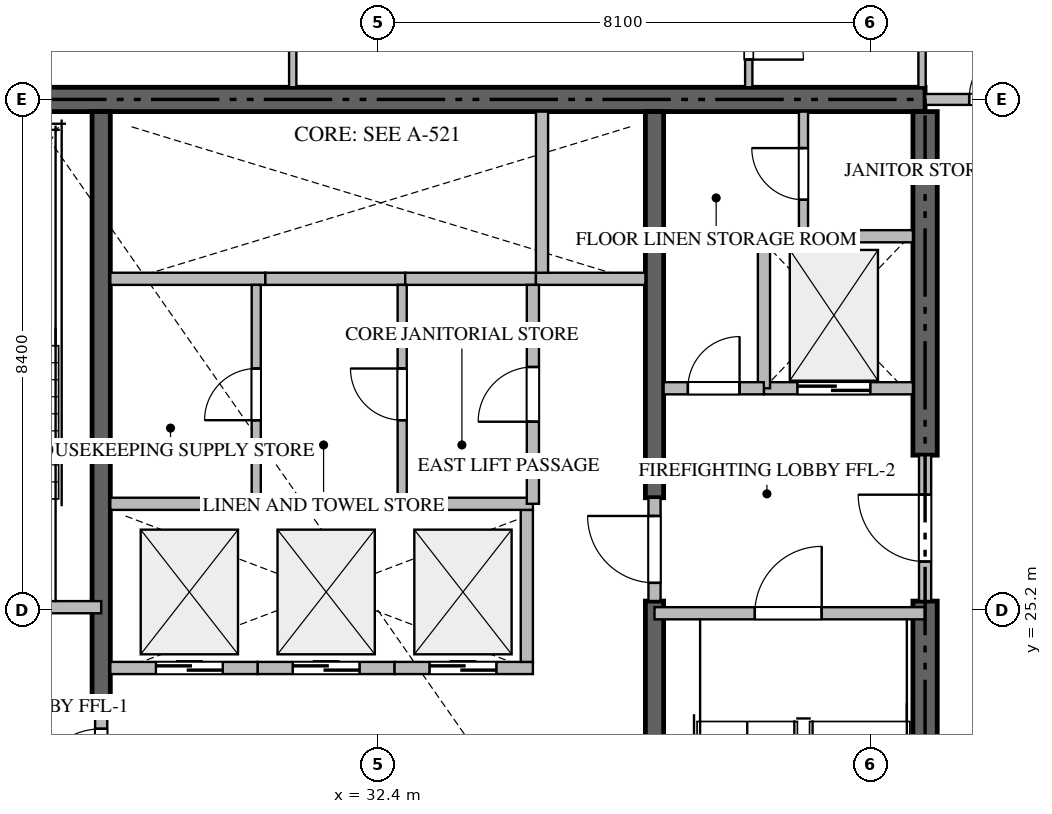
"""IFC4 building model, lengths in metres.
Left out: names, types, materials, properties, quantities, classifications, styles, units other than length and angle.
Written with IfcOpenShell. Run it as: python <this file> out.ifc"""

import sys

from ifc_helpers import new_model, si_unit, direction, frame, frame_2d, origin, place, context, subcontext, project, spatial, rectangle, extrude, source, transform, mapped, element, fill, save


model = new_model("IFC4")
c1 = context("Model", 3, precision=1e-05, world=origin(), true_north=direction((0.0, 1.0)))
c2 = subcontext(c1, "Body", "Model", "MODEL_VIEW")
j1 = project(units=[si_unit("LENGTHUNIT", "METRE"), si_unit("PLANEANGLEUNIT", "RADIAN")], contexts=[c1])
p1 = place(None, origin())
s1 = spatial("IfcSite", under=j1, at=p1, CompositionType="ELEMENT")
p2 = place(p1, origin())
s2 = spatial("IfcBuilding", under=s1, at=p2, CompositionType="ELEMENT")
p3 = place(p2, frame((0.0, 0.0, 157.65)))
s3 = spatial("IfcBuildingStorey", under=s2, at=p3, CompositionType="ELEMENT", Elevation=157.65)
p4 = place(p3, frame((41.4, 33.6, -0.26), z_axis=(0.0, 0.0, 1.0), x_axis=(-1.0, 0.0, 0.0)))
e1 = element("IfcWall", 1, at=p4, inside=s3, PredefinedType="SHEAR", context=c2, shape_type="SweptSolid", body=[
    extrude(rectangle(XDim=18.0, YDim=0.4, at=frame_2d((9.0, 0.0))), origin(), (0.0, 0.0, 1.0), 3.748),
])
p5 = place(p3, frame((41.4, 17.0, -0.26), z_axis=(0.0, 0.0, 1.0), x_axis=(0.0, 1.0, 0.0)))
e2 = element("IfcWall", 2, at=p5, inside=s3, PredefinedType="SHEAR", context=c2, shape_type="SweptSolid", body=[
    extrude(rectangle(XDim=8.35, YDim=0.4, at=frame_2d((4.175, 0.0))), origin(), (0.0, 0.0, 1.0), 3.748),
])
p6 = place(p3, frame((41.4, 27.75, -0.26), z_axis=(0.0, 0.0, 1.0), x_axis=(0.0, 1.0, 0.0)))
e3 = element("IfcWall", 3, at=p6, inside=s3, PredefinedType="SHEAR", context=c2, shape_type="SweptSolid", body=[
    extrude(rectangle(XDim=5.65, YDim=0.4, at=frame_2d((2.825, 0.0))), origin(), (0.0, 0.0, 1.0), 3.748),
])
p7 = place(p3, frame((27.85, 23.55, -0.26), z_axis=(0.0, 0.0, 1.0), x_axis=(0.0, 1.0, 0.0)))
e4 = element("IfcWall", 4, at=p7, inside=s3, PredefinedType="SHEAR", context=c2, shape_type="SweptSolid", body=[
    extrude(rectangle(XDim=9.85, YDim=0.3, at=frame_2d((4.925, 0.0))), origin(), (0.0, 0.0, 1.0), 3.748),
])
p8 = place(p3, frame((36.95, 17.0, -0.26), z_axis=(0.0, 0.0, 1.0), x_axis=(0.0, 1.0, 0.0)))
e5 = element("IfcWall", 5, at=p8, inside=s3, PredefinedType="SHEAR", context=c2, shape_type="SweptSolid", body=[
    extrude(rectangle(XDim=8.35, YDim=0.3, at=frame_2d((4.175, 0.0))), origin(), (0.0, 0.0, 1.0), 3.748),
])
p9 = place(p3, frame((36.95, 27.05, -0.26), z_axis=(0.0, 0.0, 1.0), x_axis=(0.0, 1.0, 0.0)))
e6 = element("IfcWall", 6, at=p9, inside=s3, PredefinedType="SHEAR", context=c2, shape_type="SweptSolid", body=[
    extrude(rectangle(XDim=6.35, YDim=0.3, at=frame_2d((3.175, 0.0))), origin(), (0.0, 0.0, 1.0), 3.748),
])
p10 = place(p3, frame((23.4, 25.25, 0.0), z_axis=(0.0, 0.0, 1.0), x_axis=(1.0, 0.0, 0.0)))
e7 = element("IfcWall", 7, at=p10, inside=s3, PredefinedType="STANDARD", context=c2, shape_type="SweptSolid", body=[
    extrude(rectangle(XDim=4.45, YDim=0.2, at=frame_2d((2.225, 0.0))), origin(), (0.0, 0.0, 1.0), 3.49),
])
p11 = place(p10, frame((1.65, 0.0, 0.0)))
e8 = element("IfcOpeningElement", 8, at=p11, cuts=e7, PredefinedType="OPENING", context=c2, shape_type="SweptSolid", body=[
    extrude(rectangle(XDim=1.1, YDim=2.15, at=frame_2d((0.55, 1.075))), frame((0.0, 0.11, 0.0), z_axis=(0.0, -1.0, 0.0), x_axis=(1.0, 0.0, 0.0)), (0.0, 0.0, 1.0), 0.22),
])
p12 = place(p3, frame((36.95, 25.15, 0.0), z_axis=(0.0, 0.0, 1.0), x_axis=(1.0, 0.0, 0.0)))
e9 = element("IfcWall", 9, at=p12, inside=s3, PredefinedType="STANDARD", context=c2, shape_type="SweptSolid", body=[
    extrude(rectangle(XDim=4.45, YDim=0.2, at=frame_2d((2.225, 0.0))), origin(), (0.0, 0.0, 1.0), 3.49),
])
p13 = place(p12, frame((1.65, 0.0, 0.0)))
e10 = element("IfcOpeningElement", 10, at=p13, cuts=e9, PredefinedType="OPENING", context=c2, shape_type="SweptSolid", body=[
    extrude(rectangle(XDim=1.1, YDim=2.15, at=frame_2d((0.55, 1.075))), frame((0.0, 0.11, 0.0), z_axis=(0.0, -1.0, 0.0), x_axis=(1.0, 0.0, 0.0)), (0.0, 0.0, 1.0), 0.22),
])
p14 = place(p3, frame((38.75, 28.85, 0.0), z_axis=(0.0, 0.0, 1.0), x_axis=(1.0, 0.0, 0.0)))
e11 = element("IfcWall", 11, at=p14, inside=s3, PredefinedType="STANDARD", context=c2, shape_type="SweptSolid", body=[
    extrude(rectangle(XDim=2.45, YDim=0.2, at=frame_2d((1.225, 0.0))), origin(), (0.0, 0.0, 1.0), 3.49),
])
p15 = place(p14, frame((0.55, 0.0, 0.0)))
e12 = element("IfcOpeningElement", 12, at=p15, cuts=e11, PredefinedType="OPENING", context=c2, shape_type="SweptSolid", body=[
    extrude(rectangle(XDim=1.2, YDim=2.2, at=frame_2d((0.6, 1.1))), frame((0.0, 0.11, 0.0), z_axis=(0.0, -1.0, 0.0), x_axis=(1.0, 0.0, 0.0)), (0.0, 0.0, 1.0), 0.22),
])
p16 = place(p3, frame((28.0, 24.25, 0.0), z_axis=(0.0, 0.0, 1.0), x_axis=(1.0, 0.0, 0.0)))
e13 = element("IfcWall", 13, at=p16, inside=s3, PredefinedType="STANDARD", context=c2, shape_type="SweptSolid", body=[
    extrude(rectangle(XDim=2.425, YDim=0.2, at=frame_2d((1.212, 0.0))), origin(), (0.0, 0.0, 1.0), 3.49),
])
p17 = place(p16, frame((0.75, 0.0, 0.0)))
e14 = element("IfcOpeningElement", 14, at=p17, cuts=e13, PredefinedType="OPENING", context=c2, shape_type="SweptSolid", body=[
    extrude(rectangle(XDim=1.1, YDim=2.2, at=frame_2d((0.55, 1.1))), frame((0.0, 0.11, 0.0), z_axis=(0.0, -1.0, 0.0), x_axis=(1.0, 0.0, 0.0)), (0.0, 0.0, 1.0), 0.22),
])
p18 = place(p3, frame((30.425, 24.25, 0.0), z_axis=(0.0, 0.0, 1.0), x_axis=(1.0, 0.0, 0.0)))
e15 = element("IfcWall", 15, at=p18, inside=s3, PredefinedType="STANDARD", context=c2, shape_type="SweptSolid", body=[
    extrude(rectangle(XDim=2.25, YDim=0.2, at=frame_2d((1.125, 0.0))), origin(), (0.0, 0.0, 1.0), 3.49),
])
p19 = place(p18, frame((0.575, 0.0, 0.0)))
e16 = element("IfcOpeningElement", 16, at=p19, cuts=e15, PredefinedType="OPENING", context=c2, shape_type="SweptSolid", body=[
    extrude(rectangle(XDim=1.1, YDim=2.2, at=frame_2d((0.55, 1.1))), frame((0.0, 0.11, 0.0), z_axis=(0.0, -1.0, 0.0), x_axis=(1.0, 0.0, 0.0)), (0.0, 0.0, 1.0), 0.22),
])
p20 = place(p3, frame((32.675, 24.25, 0.0), z_axis=(0.0, 0.0, 1.0), x_axis=(1.0, 0.0, 0.0)))
e17 = element("IfcWall", 17, at=p20, inside=s3, PredefinedType="STANDARD", context=c2, shape_type="SweptSolid", body=[
    extrude(rectangle(XDim=2.275, YDim=0.2, at=frame_2d((1.137, 0.0))), origin(), (0.0, 0.0, 1.0), 3.49),
])
p21 = place(p20, frame((0.575, 0.0, 0.0)))
e18 = element("IfcOpeningElement", 18, at=p21, cuts=e17, PredefinedType="OPENING", context=c2, shape_type="SweptSolid", body=[
    extrude(rectangle(XDim=1.1, YDim=2.2, at=frame_2d((0.55, 1.1))), frame((0.0, 0.11, 0.0), z_axis=(0.0, -1.0, 0.0), x_axis=(1.0, 0.0, 0.0)), (0.0, 0.0, 1.0), 0.22),
])
p22 = place(p3, frame((34.85, 24.35, 0.0), z_axis=(0.0, 0.0, 1.0), x_axis=(0.0, 1.0, 0.0)))
e19 = element("IfcWall", 19, at=p22, inside=s3, PredefinedType="STANDARD", context=c2, shape_type="SweptSolid", body=[
    extrude(rectangle(XDim=2.5, YDim=0.2, at=frame_2d((1.25, 0.0))), origin(), (0.0, 0.0, 1.0), 3.49),
])
p23 = place(p3, frame((28.0, 30.65, 0.0), z_axis=(0.0, 0.0, 1.0), x_axis=(1.0, 0.0, 0.0)))
e20 = element("IfcWall", 20, at=p23, inside=s3, PredefinedType="STANDARD", context=c2, shape_type="SweptSolid", body=[
    extrude(rectangle(XDim=2.55, YDim=0.2, at=frame_2d((1.275, 0.0))), origin(), (0.0, 0.0, 1.0), 3.49),
])
p24 = place(p3, frame((30.55, 30.65, 0.0), z_axis=(0.0, 0.0, 1.0), x_axis=(1.0, 0.0, 0.0)))
e21 = element("IfcWall", 21, at=p24, inside=s3, PredefinedType="STANDARD", context=c2, shape_type="SweptSolid", body=[
    extrude(rectangle(XDim=2.3, YDim=0.2, at=frame_2d((1.15, 0.0))), origin(), (0.0, 0.0, 1.0), 3.49),
])
p25 = place(p3, frame((32.85, 30.65, 0.0), z_axis=(0.0, 0.0, 1.0), x_axis=(1.0, 0.0, 0.0)))
e22 = element("IfcWall", 22, at=p25, inside=s3, PredefinedType="STANDARD", context=c2, shape_type="SweptSolid", body=[
    extrude(rectangle(XDim=2.15, YDim=0.2, at=frame_2d((1.075, 0.0))), origin(), (0.0, 0.0, 1.0), 3.49),
])
p26 = place(p3, frame((35.0, 30.65, 0.0), z_axis=(0.0, 0.0, 1.0), x_axis=(1.0, 0.0, 0.0)))
e23 = element("IfcWall", 23, at=p26, inside=s3, PredefinedType="STANDARD", context=c2, shape_type="SweptSolid", body=[
    extrude(rectangle(XDim=1.8, YDim=0.2, at=frame_2d((0.9, 0.0))), origin(), (0.0, 0.0, 1.0), 3.49),
])
p27 = place(p3, frame((35.1, 30.75, 0.0), z_axis=(0.0, 0.0, 1.0), x_axis=(0.0, 1.0, 0.0)))
e24 = element("IfcWall", 24, at=p27, inside=s3, PredefinedType="STANDARD", context=c2, shape_type="SweptSolid", body=[
    extrude(rectangle(XDim=2.65, YDim=0.2, at=frame_2d((1.325, 0.0))), origin(), (0.0, 0.0, 1.0), 3.49),
])
p28 = place(p3, frame((38.75, 28.85, 0.0), z_axis=(0.0, 0.0, 1.0), x_axis=(0.0, 1.0, 0.0)))
e25 = element("IfcWall", 25, at=p28, inside=s3, PredefinedType="STANDARD", context=c2, shape_type="SweptSolid", body=[
    extrude(rectangle(XDim=2.5, YDim=0.2, at=frame_2d((1.25, 0.0))), origin(), (0.0, 0.0, 1.0), 3.49),
])
p29 = place(p3, frame((38.75, 31.35, 0.0), z_axis=(0.0, 0.0, 1.0), x_axis=(1.0, 0.0, 0.0)))
e26 = element("IfcWall", 26, at=p29, inside=s3, PredefinedType="STANDARD", context=c2, shape_type="SweptSolid", body=[
    extrude(rectangle(XDim=2.45, YDim=0.2, at=frame_2d((1.225, 0.0))), origin(), (0.0, 0.0, 1.0), 3.49),
])
p30 = place(p3, frame((37.1, 28.85, 0.0), z_axis=(0.0, 0.0, 1.0), x_axis=(1.0, 0.0, 0.0)))
e27 = element("IfcWall", 27, at=p30, inside=s3, PredefinedType="STANDARD", context=c2, shape_type="SweptSolid", body=[
    extrude(rectangle(XDim=1.648, YDim=0.2, at=frame_2d((0.824, 0.0))), origin(), (0.0, 0.0, 1.0), 3.49),
])
p31 = place(p30, frame((0.399, 0.0, 0.0)))
e28 = element("IfcOpeningElement", 28, at=p31, cuts=e27, PredefinedType="OPENING", context=c2, shape_type="SweptSolid", body=[
    extrude(rectangle(XDim=0.85, YDim=2.1, at=frame_2d((0.425, 1.05))), frame((0.0, 0.11, 0.0), z_axis=(0.0, -1.0, 0.0), x_axis=(1.0, 0.0, 0.0)), (0.0, 0.0, 1.0), 0.22),
])
p32 = place(p3, frame((41.4, 25.352, 0.0), z_axis=(0.0, 0.0, 1.0), x_axis=(0.0, 1.0, 0.0)))
e29 = element("IfcWall", 29, at=p32, inside=s3, PredefinedType="STANDARD", context=c2, shape_type="SweptSolid", body=[
    extrude(rectangle(XDim=2.396, YDim=0.2, at=frame_2d((1.198, 0.0))), origin(), (0.0, 0.0, 1.0), 3.49),
])
p33 = place(p32, frame((0.648, 0.0, 0.0)))
e30 = element("IfcOpeningElement", 30, at=p33, cuts=e29, PredefinedType="OPENING", context=c2, shape_type="SweptSolid", body=[
    extrude(rectangle(XDim=1.1, YDim=2.15, at=frame_2d((0.55, 1.075))), frame((0.0, 0.11, 0.0), z_axis=(0.0, -1.0, 0.0), x_axis=(1.0, 0.0, 0.0)), (0.0, 0.0, 1.0), 0.22),
])
p34 = place(p3, frame((27.85, 21.852, 0.0), z_axis=(0.0, 0.0, 1.0), x_axis=(0.0, 1.0, 0.0)))
e31 = element("IfcWall", 31, at=p34, inside=s3, PredefinedType="STANDARD", context=c2, shape_type="SweptSolid", body=[
    extrude(rectangle(XDim=1.696, YDim=0.2, at=frame_2d((0.848, 0.0))), origin(), (0.0, 0.0, 1.0), 3.49),
])
p35 = place(p34, frame((0.298, 0.0, 0.0)))
e32 = element("IfcOpeningElement", 32, at=p35, cuts=e31, PredefinedType="OPENING", context=c2, shape_type="SweptSolid", body=[
    extrude(rectangle(XDim=1.1, YDim=2.15, at=frame_2d((0.55, 1.075))), frame((0.0, 0.11, 0.0), z_axis=(0.0, -1.0, 0.0), x_axis=(1.0, 0.0, 0.0)), (0.0, 0.0, 1.0), 0.22),
])
p36 = place(p3, frame((36.95, 25.352, 0.0), z_axis=(0.0, 0.0, 1.0), x_axis=(0.0, 1.0, 0.0)))
e33 = element("IfcWall", 33, at=p36, inside=s3, PredefinedType="STANDARD", context=c2, shape_type="SweptSolid", body=[
    extrude(rectangle(XDim=1.696, YDim=0.2, at=frame_2d((0.848, 0.0))), origin(), (0.0, 0.0, 1.0), 3.49),
])
p37 = place(p36, frame((0.298, 0.0, 0.0)))
e34 = element("IfcOpeningElement", 34, at=p37, cuts=e33, PredefinedType="OPENING", context=c2, shape_type="SweptSolid", body=[
    extrude(rectangle(XDim=1.1, YDim=2.15, at=frame_2d((0.55, 1.075))), frame((0.0, 0.11, 0.0), z_axis=(0.0, -1.0, 0.0), x_axis=(1.0, 0.0, 0.0)), (0.0, 0.0, 1.0), 0.22),
])
p38 = place(p3, frame((28.0, 26.95, 0.0), z_axis=(0.0, 0.0, 1.0), x_axis=(1.0, 0.0, 0.0)))
e35 = element("IfcWall", 35, at=p38, inside=s3, PredefinedType="STANDARD", context=c2, shape_type="SweptSolid", body=[
    extrude(rectangle(XDim=6.95, YDim=0.2, at=frame_2d((3.475, 0.0))), origin(), (0.0, 0.0, 1.0), 3.49),
])
p39 = place(p3, frame((39.4, 31.35, 0.0), z_axis=(0.0, 0.0, 1.0), x_axis=(0.0, 1.0, 0.0)))
e36 = element("IfcWall", 36, at=p39, inside=s3, PredefinedType="PARTITIONING", context=c2, shape_type="SweptSolid", body=[
    extrude(rectangle(XDim=2.05, YDim=0.15, at=frame_2d((1.025, 0.0))), origin(), (0.0, 0.0, 1.0), 3.49),
])
p40 = place(p39, frame((0.6, 0.0, 0.0)))
e37 = element("IfcOpeningElement", 37, at=p40, cuts=e36, PredefinedType="OPENING", context=c2, shape_type="SweptSolid", body=[
    extrude(rectangle(XDim=0.85, YDim=2.1, at=frame_2d((0.425, 1.05))), frame((0.0, 0.085, 0.0), z_axis=(0.0, -1.0, 0.0), x_axis=(1.0, 0.0, 0.0)), (0.0, 0.0, 1.0), 0.17),
])
p41 = place(p3, frame((34.95, 26.95, 0.0), z_axis=(0.0, 0.0, 1.0), x_axis=(0.0, 1.0, 0.0)))
e38 = element("IfcWall", 38, at=p41, inside=s3, PredefinedType="STANDARD", context=c2, shape_type="SweptSolid", body=[
    extrude(rectangle(XDim=3.6, YDim=0.2, at=frame_2d((1.8, 0.0))), origin(), (0.0, 0.0, 1.0), 3.49),
])
p42 = place(p41, frame((1.35, 0.0, 0.0)))
e39 = element("IfcOpeningElement", 39, at=p42, cuts=e38, PredefinedType="OPENING", context=c2, shape_type="SweptSolid", body=[
    extrude(rectangle(XDim=0.9, YDim=2.1, at=frame_2d((0.45, 1.05))), frame((0.0, 0.11, 0.0), z_axis=(0.0, -1.0, 0.0), x_axis=(1.0, 0.0, 0.0)), (0.0, 0.0, 1.0), 0.22),
])
p43 = place(p3, frame((32.8, 26.95, 0.0), z_axis=(0.0, 0.0, 1.0), x_axis=(0.0, 1.0, 0.0)))
e40 = element("IfcWall", 40, at=p43, inside=s3, PredefinedType="PARTITIONING", context=c2, shape_type="SweptSolid", body=[
    extrude(rectangle(XDim=3.6, YDim=0.15, at=frame_2d((1.8, 0.0))), origin(), (0.0, 0.0, 1.0), 3.49),
])
p44 = place(p43, frame((1.375, 0.0, 0.0)))
e41 = element("IfcOpeningElement", 41, at=p44, cuts=e40, PredefinedType="OPENING", context=c2, shape_type="SweptSolid", body=[
    extrude(rectangle(XDim=0.85, YDim=2.1, at=frame_2d((0.425, 1.05))), frame((0.0, 0.085, 0.0), z_axis=(0.0, -1.0, 0.0), x_axis=(1.0, 0.0, 0.0)), (0.0, 0.0, 1.0), 0.17),
])
p45 = place(p3, frame((30.4, 26.95, 0.0), z_axis=(0.0, 0.0, 1.0), x_axis=(0.0, 1.0, 0.0)))
e42 = element("IfcWall", 42, at=p45, inside=s3, PredefinedType="PARTITIONING", context=c2, shape_type="SweptSolid", body=[
    extrude(rectangle(XDim=3.6, YDim=0.15, at=frame_2d((1.8, 0.0))), origin(), (0.0, 0.0, 1.0), 3.49),
])
p46 = place(p45, frame((1.375, 0.0, 0.0)))
e43 = element("IfcOpeningElement", 43, at=p46, cuts=e42, PredefinedType="OPENING", context=c2, shape_type="SweptSolid", body=[
    extrude(rectangle(XDim=0.85, YDim=2.1, at=frame_2d((0.425, 1.05))), frame((0.0, 0.085, 0.0), z_axis=(0.0, -1.0, 0.0), x_axis=(1.0, 0.0, 0.0)), (0.0, 0.0, 1.0), 0.17),
])
p47 = place(p3, frame((41.402, 33.6, 0.0), z_axis=(0.0, 0.0, 1.0), x_axis=(1.0, 0.0, 0.0)))
e44 = element("IfcWall", 44, at=p47, inside=s3, PredefinedType="PARTITIONING", context=c2, shape_type="SweptSolid", body=[
    extrude(rectangle(XDim=2.446, YDim=0.18, at=frame_2d((1.223, 0.0))), origin(), (0.0, 0.0, 1.0), 3.49),
])
p48 = place(p47, frame((0.723, 0.0, 0.0)))
e45 = element("IfcOpeningElement", 45, at=p48, cuts=e44, PredefinedType="OPENING", context=c2, shape_type="SweptSolid", body=[
    extrude(rectangle(XDim=1.0, YDim=2.15, at=frame_2d((0.5, 1.075))), frame((0.0, 0.1, 0.0), z_axis=(0.0, -1.0, 0.0), x_axis=(1.0, 0.0, 0.0)), (0.0, 0.0, 1.0), 0.2),
])
p49 = place(p3, frame((41.35, 36.35, 0.0), z_axis=(0.0, 0.0, 1.0), x_axis=(0.0, -1.0, 0.0)))
e46 = element("IfcWall", 46, at=p49, inside=s3, PredefinedType="PARTITIONING", context=c2, shape_type="SweptSolid", body=[
    extrude(rectangle(XDim=2.55, YDim=0.12, at=frame_2d((1.275, 0.0))), origin(), (0.0, 0.0, 1.0), 3.49),
])
p50 = place(p3, frame((38.5, 35.75, 0.0), z_axis=(0.0, 0.0, 1.0), x_axis=(0.0, -1.0, 0.0)))
e47 = element("IfcWall", 47, at=p50, inside=s3, PredefinedType="PARTITIONING", context=c2, shape_type="SweptSolid", body=[
    extrude(rectangle(XDim=1.95, YDim=0.12, at=frame_2d((0.975, 0.0))), origin(), (0.0, 0.0, 1.0), 3.49),
])
p51 = place(p50, frame((0.595, 0.0, 0.0)))
e48 = element("IfcOpeningElement", 48, at=p51, cuts=e47, PredefinedType="OPENING", context=c2, shape_type="SweptSolid", body=[
    extrude(rectangle(XDim=0.9, YDim=2.1, at=frame_2d((0.45, 1.05))), frame((0.0, 0.07, 0.0), z_axis=(0.0, -1.0, 0.0), x_axis=(1.0, 0.0, 0.0)), (0.0, 0.0, 1.0), 0.14),
])
p52 = place(p3, frame((31.0, 35.748, 0.0), z_axis=(0.0, 0.0, 1.0), x_axis=(0.0, -1.0, 0.0)))
e49 = element("IfcWall", 49, at=p52, inside=s3, PredefinedType="PARTITIONING", context=c2, shape_type="SweptSolid", body=[
    extrude(rectangle(XDim=1.948, YDim=0.12, at=frame_2d((0.974, 0.0))), origin(), (0.0, 0.0, 1.0), 3.49),
])
m1 = source(origin(), c2, "Body", "SweptSolid", [
    extrude(rectangle(XDim=1.1, YDim=2.15, at=frame_2d((0.55, 1.075))), frame((0.0, 0.025, 0.0), z_axis=(0.0, -1.0, 0.0), x_axis=(1.0, 0.0, 0.0)), (0.0, 0.0, 1.0), 0.05),
])
p53 = place(p13, origin())
e50 = element("IfcDoor", 50, at=p53, inside=s3, OperationType="SINGLE_SWING_RIGHT", PredefinedType="DOOR", context=c2, shape_type="MappedRepresentation", body=[
    mapped(m1, transform((0.0, 0.0, 0.0), scale=1.0)),
])
fill(e10, e50)
m2 = source(origin(), c2, "Body", "SweptSolid", [
    extrude(rectangle(XDim=1.2, YDim=2.2, at=frame_2d((0.6, 1.1))), frame((0.0, 0.025, 0.0), z_axis=(0.0, -1.0, 0.0), x_axis=(1.0, 0.0, 0.0)), (0.0, 0.0, 1.0), 0.05),
])
p54 = place(p15, origin())
e51 = element("IfcDoor", 51, at=p54, inside=s3, OperationType="DOUBLE_DOOR_SLIDING", PredefinedType="DOOR", context=c2, shape_type="MappedRepresentation", body=[
    mapped(m2, transform((0.0, 0.0, 0.0), scale=1.0)),
])
fill(e12, e51)
m3 = source(origin(), c2, "Body", "SweptSolid", [
    extrude(rectangle(XDim=1.1, YDim=2.2, at=frame_2d((0.55, 1.1))), frame((0.0, 0.025, 0.0), z_axis=(0.0, -1.0, 0.0), x_axis=(1.0, 0.0, 0.0)), (0.0, 0.0, 1.0), 0.05),
])
p55 = place(p17, origin())
e52 = element("IfcDoor", 52, at=p55, inside=s3, OperationType="DOUBLE_DOOR_SLIDING", PredefinedType="DOOR", context=c2, shape_type="MappedRepresentation", body=[
    mapped(m3, transform((0.0, 0.0, 0.0), scale=1.0)),
])
fill(e14, e52)
p56 = place(p19, origin())
e53 = element("IfcDoor", 53, at=p56, inside=s3, OperationType="DOUBLE_DOOR_SLIDING", PredefinedType="DOOR", context=c2, shape_type="MappedRepresentation", body=[
    mapped(m3, transform((0.0, 0.0, 0.0), scale=1.0)),
])
fill(e16, e53)
p57 = place(p21, origin())
e54 = element("IfcDoor", 54, at=p57, inside=s3, OperationType="DOUBLE_DOOR_SLIDING", PredefinedType="DOOR", context=c2, shape_type="MappedRepresentation", body=[
    mapped(m3, transform((0.0, 0.0, 0.0), scale=1.0)),
])
fill(e18, e54)
m4 = source(origin(), c2, "Body", "SweptSolid", [
    extrude(rectangle(XDim=0.85, YDim=2.1, at=frame_2d((0.425, 1.05))), frame((0.0, 0.025, 0.0), z_axis=(0.0, -1.0, 0.0), x_axis=(1.0, 0.0, 0.0)), (0.0, 0.0, 1.0), 0.05),
])
p58 = place(p31, origin())
e55 = element("IfcDoor", 55, at=p58, inside=s3, OperationType="SINGLE_SWING_RIGHT", PredefinedType="DOOR", context=c2, shape_type="MappedRepresentation", body=[
    mapped(m4, transform((0.0, 0.0, 0.0), scale=1.0)),
])
fill(e28, e55)
p59 = place(p33, origin())
e56 = element("IfcDoor", 56, at=p59, inside=s3, OperationType="SINGLE_SWING_RIGHT", PredefinedType="DOOR", context=c2, shape_type="MappedRepresentation", body=[
    mapped(m1, transform((0.0, 0.0, 0.0), scale=1.0)),
])
fill(e30, e56)
p60 = place(p35, origin())
e57 = element("IfcDoor", 57, at=p60, inside=s3, OperationType="SINGLE_SWING_LEFT", PredefinedType="DOOR", context=c2, shape_type="MappedRepresentation", body=[
    mapped(m1, transform((0.0, 0.0, 0.0), scale=1.0)),
])
fill(e32, e57)
p61 = place(p37, origin())
e58 = element("IfcDoor", 58, at=p61, inside=s3, OperationType="SINGLE_SWING_RIGHT", PredefinedType="DOOR", context=c2, shape_type="MappedRepresentation", body=[
    mapped(m1, transform((0.0, 0.0, 0.0), scale=1.0)),
])
fill(e34, e58)
p62 = place(p40, origin())
e59 = element("IfcDoor", 59, at=p62, inside=s3, OperationType="SINGLE_SWING_RIGHT", PredefinedType="DOOR", context=c2, shape_type="MappedRepresentation", body=[
    mapped(m4, transform((0.0, 0.0, 0.0), scale=1.0)),
])
fill(e37, e59)
m5 = source(origin(), c2, "Body", "SweptSolid", [
    extrude(rectangle(XDim=0.9, YDim=2.1, at=frame_2d((0.45, 1.05))), frame((0.0, 0.025, 0.0), z_axis=(0.0, -1.0, 0.0), x_axis=(1.0, 0.0, 0.0)), (0.0, 0.0, 1.0), 0.05),
])
p63 = place(p42, origin())
e60 = element("IfcDoor", 60, at=p63, inside=s3, OperationType="SINGLE_SWING_LEFT", PredefinedType="DOOR", context=c2, shape_type="MappedRepresentation", body=[
    mapped(m5, transform((0.0, 0.0, 0.0), scale=1.0)),
])
fill(e39, e60)
p64 = place(p44, origin())
e61 = element("IfcDoor", 61, at=p64, inside=s3, OperationType="SINGLE_SWING_RIGHT", PredefinedType="DOOR", context=c2, shape_type="MappedRepresentation", body=[
    mapped(m4, transform((0.0, 0.0, 0.0), scale=1.0)),
])
fill(e41, e61)
p65 = place(p46, origin())
e62 = element("IfcDoor", 62, at=p65, inside=s3, OperationType="SINGLE_SWING_LEFT", PredefinedType="DOOR", context=c2, shape_type="MappedRepresentation", body=[
    mapped(m4, transform((0.0, 0.0, 0.0), scale=1.0)),
])
fill(e43, e62)
m6 = source(origin(), c2, "Body", "SweptSolid", [
    extrude(rectangle(XDim=1.0, YDim=2.15, at=frame_2d((0.5, 1.075))), frame((0.0, 0.025, 0.0), z_axis=(0.0, -1.0, 0.0), x_axis=(1.0, 0.0, 0.0)), (0.0, 0.0, 1.0), 0.05),
])
p66 = place(p48, origin())
e63 = element("IfcDoor", 63, at=p66, inside=s3, OperationType="SINGLE_SWING_RIGHT", PredefinedType="DOOR", context=c2, shape_type="MappedRepresentation", body=[
    mapped(m6, transform((0.0, 0.0, 0.0), scale=1.0)),
])
fill(e45, e63)
p67 = place(p51, origin())
e64 = element("IfcDoor", 64, at=p67, inside=s3, OperationType="SINGLE_SWING_RIGHT", PredefinedType="DOOR", context=c2, shape_type="MappedRepresentation", body=[
    mapped(m5, transform((0.0, 0.0, 0.0), scale=1.0)),
])
fill(e48, e64)
save(model, sys.argv[1])
